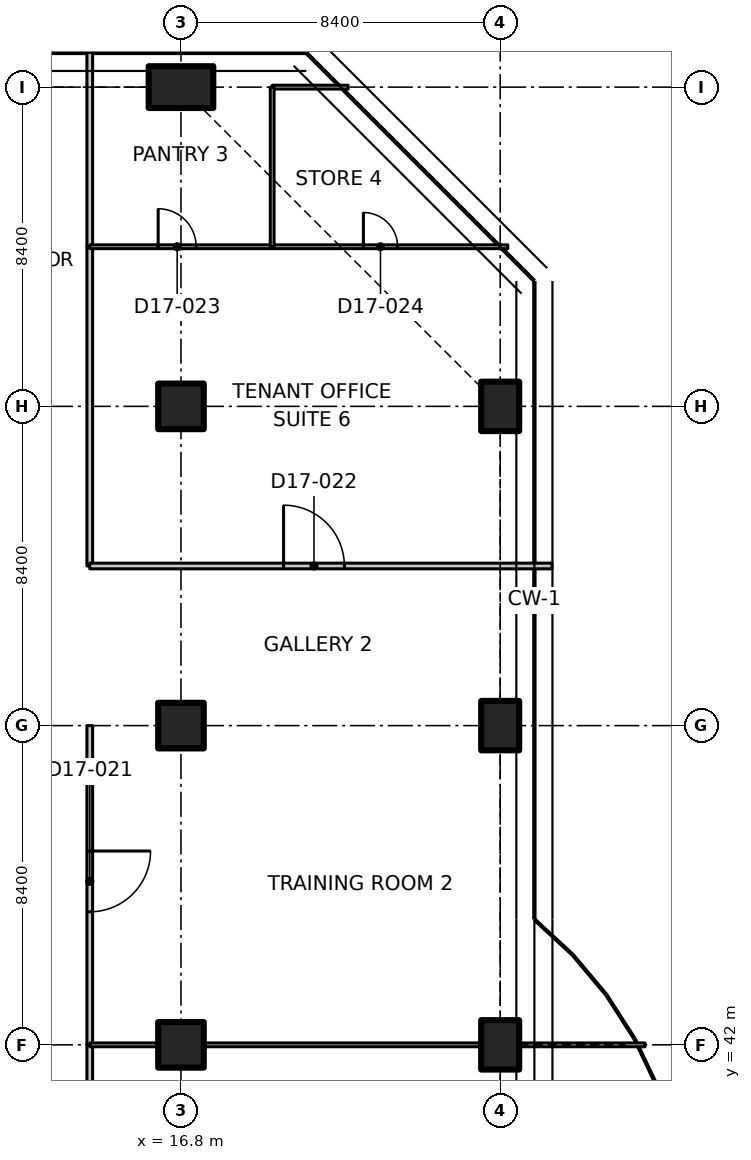
"""IFC4 building model, lengths in metres.
Left out: names, types, materials, properties, quantities, classifications, styles, units other than length and angle.
Written with IfcOpenShell. Run it as: python <this file> out.ifc"""

import sys

from ifc_helpers import new_model, si_unit, direction, frame, frame_2d, origin, origin_2d, place, context, subcontext, project, spatial, polyline, rectangle, outline, extrude, element, fill, save


model = new_model("IFC4")
c1 = context("Model", 3, precision=1e-05, world=origin(), true_north=direction((0.0, 1.0)))
c2 = subcontext(c1, "Body", "Model", "MODEL_VIEW")
j1 = project(units=[si_unit("LENGTHUNIT", "METRE"), si_unit("PLANEANGLEUNIT", "RADIAN")], contexts=[c1])
p1 = place(None, origin())
s1 = spatial("IfcSite", under=j1, at=p1, CompositionType="ELEMENT")
p2 = place(p1, origin())
s2 = spatial("IfcBuilding", under=s1, at=p2, CompositionType="ELEMENT")
p3 = place(p2, frame((0.0, 0.0, 142.1)))
s3 = spatial("IfcBuildingStorey", under=s2, at=p3, CompositionType="ELEMENT", Elevation=142.1)
for number, where, z_axis, x_axis in (
    (1, (16.8, 42.0, 0.0), (0.0, 0.0, 1.0), (1.0, 0.0, 0.0)),
    (2, (16.8, 50.4, 0.0), (0.0, 0.0, 1.0), (1.0, 0.0, 0.0)),
    (3, (16.8, 58.8, 0.0), (0.0, 0.0, 1.0), (1.0, 0.0, 0.0)),
):
    element("IfcColumn", number, at=place(p3, frame(where, z_axis=z_axis, x_axis=x_axis)), inside=s3, PredefinedType="COLUMN", context=c2, shape_type="SweptSolid", body=[
        extrude(rectangle(XDim=1.2, YDim=1.2, at=origin_2d()), origin(), (0.0, 0.0, 1.0), 3.35),
    ])
p4 = place(p3, frame((16.8, 67.2, 0.0), z_axis=(0.0, 0.0, 1.0), x_axis=(0.0, 1.0, 0.0)))
e4 = element("IfcColumn", 4, at=p4, inside=s3, PredefinedType="COLUMN", context=c2, shape_type="SweptSolid", body=[
    extrude(rectangle(XDim=1.1, YDim=1.7, at=origin_2d()), origin(), (0.0, 0.0, 1.0), 3.35),
])
for number, where, z_axis, x_axis in (
    (5, (25.2, 42.0, 0.0), (0.0, 0.0, 1.0), (1.0, 0.0, 0.0)),
    (6, (25.2, 50.4, 0.0), (0.0, 0.0, 1.0), (1.0, 0.0, 0.0)),
    (7, (25.2, 58.8, 0.0), (0.0, 0.0, 1.0), (1.0, 0.0, 0.0)),
):
    element("IfcColumn", number, at=place(p3, frame(where, z_axis=z_axis, x_axis=x_axis)), inside=s3, PredefinedType="COLUMN", context=c2, shape_type="SweptSolid", body=[
        extrude(rectangle(XDim=1.0, YDim=1.3, at=origin_2d()), origin(), (0.0, 0.0, 1.0), 3.35),
    ])
p5 = place(p3, frame((14.4, 42.0, 0.0), z_axis=(0.0, 0.0, 1.0), x_axis=(0.0, -1.0, 0.0)))
e8 = element("IfcWall", 8, at=p5, inside=s3, PredefinedType="PARTITIONING", context=c2, shape_type="SweptSolid", body=[
    extrude(rectangle(XDim=8.4, YDim=0.15, at=frame_2d((4.2, 0.0))), origin(), (0.0, 0.0, 1.0), 3.33),
])
p6 = place(p3, frame((14.4, 50.4, 0.0), z_axis=(0.0, 0.0, 1.0), x_axis=(0.0, -1.0, 0.0)))
e9 = element("IfcWall", 9, at=p6, inside=s3, PredefinedType="PARTITIONING", context=c2, shape_type="SweptSolid", body=[
    extrude(rectangle(XDim=8.4, YDim=0.15, at=frame_2d((4.2, 0.0))), origin(), (0.0, 0.0, 1.0), 3.33),
])
p7 = place(p6, frame((3.3, 0.0, 0.0)))
e10 = element("IfcOpeningElement", 10, at=p7, cuts=e9, PredefinedType="OPENING", context=c2, shape_type="SweptSolid", body=[
    extrude(rectangle(XDim=1.6, YDim=2.1, at=frame_2d((0.8, 1.05))), frame((0.0, 0.085, 0.0), z_axis=(0.0, -1.0, 0.0), x_axis=(1.0, 0.0, 0.0)), (0.0, 0.0, 1.0), 0.17),
])
p8 = place(p3, frame((14.4, 63.0, 0.0), z_axis=(0.0, 0.0, 1.0), x_axis=(0.0, -1.0, 0.0)))
e11 = element("IfcWall", 11, at=p8, inside=s3, PredefinedType="PARTITIONING", context=c2, shape_type="SweptSolid", body=[
    extrude(rectangle(XDim=8.4, YDim=0.15, at=frame_2d((4.2, 0.0))), origin(), (0.0, 0.0, 1.0), 3.33),
])
p9 = place(p3, frame((14.4, 68.28, 0.0), z_axis=(0.0, 0.0, 1.0), x_axis=(0.0, -1.0, 0.0)))
e12 = element("IfcWall", 12, at=p9, inside=s3, PredefinedType="PARTITIONING", context=c2, shape_type="SweptSolid", body=[
    extrude(outline(polyline([(0.0, 0.0), (5.28, 0.0), (5.28, 3.33), (1.53, 3.33), (1.528, 2.98), (0.632, 2.98), (0.63, 3.33), (0.0, 3.33), (0.0, 0.0)])), frame((0.0, 0.075, 0.0), z_axis=(0.0, -1.0, 0.0), x_axis=(1.0, 0.0, 0.0)), (0.0, 0.0, 1.0), 0.15),
])
p10 = place(p3, frame((14.4, 54.6, 0.0), z_axis=(0.0, 0.0, 1.0), x_axis=(1.0, 0.0, 0.0)))
e13 = element("IfcWall", 13, at=p10, inside=s3, PredefinedType="PARTITIONING", context=c2, shape_type="SweptSolid", body=[
    extrude(outline(polyline([(0.0, 0.0), (12.165, 0.0), (12.165, 3.33), (11.9, 3.33), (11.25, 3.33), (11.248, 2.98), (10.352, 2.98), (10.35, 3.33), (0.0, 3.33), (0.0, 0.0)])), frame((0.0, 0.075, 0.0), z_axis=(0.0, -1.0, 0.0), x_axis=(1.0, 0.0, 0.0)), (0.0, 0.0, 1.0), 0.15),
])
p11 = place(p10, frame((5.1, 0.0, 0.0)))
e14 = element("IfcOpeningElement", 14, at=p11, cuts=e13, PredefinedType="OPENING", context=c2, shape_type="SweptSolid", body=[
    extrude(rectangle(XDim=1.6, YDim=2.1, at=frame_2d((0.8, 1.05))), frame((0.0, 0.085, 0.0), z_axis=(0.0, -1.0, 0.0), x_axis=(1.0, 0.0, 0.0)), (0.0, 0.0, 1.0), 0.17),
])
p12 = place(p3, frame((14.4, 42.0, 0.0), z_axis=(0.0, 0.0, 1.0), x_axis=(1.0, 0.0, 0.0)))
e15 = element("IfcWall", 15, at=p12, inside=s3, PredefinedType="PARTITIONING", context=c2, shape_type="SweptSolid", body=[
    extrude(rectangle(XDim=1.78, YDim=0.1, at=frame_2d((0.89, 0.0))), origin(), (0.0, 0.0, 1.0), 3.33),
])
p13 = place(p3, frame((17.42, 42.0, 0.0), z_axis=(0.0, 0.0, 1.0), x_axis=(1.0, 0.0, 0.0)))
e16 = element("IfcWall", 16, at=p13, inside=s3, PredefinedType="PARTITIONING", context=c2, shape_type="SweptSolid", body=[
    extrude(rectangle(XDim=7.26, YDim=0.1, at=frame_2d((3.63, 0.0))), origin(), (0.0, 0.0, 1.0), 3.33),
])
p14 = place(p3, frame((25.72, 42.0, 0.0), z_axis=(0.0, 0.0, 1.0), x_axis=(1.0, 0.0, 0.0)))
e17 = element("IfcWall", 17, at=p14, inside=s3, PredefinedType="PARTITIONING", context=c2, shape_type="SweptSolid", body=[
    extrude(rectangle(XDim=3.292, YDim=0.1, at=frame_2d((1.646, 0.0))), origin(), (0.0, 0.0, 1.0), 2.98),
])
p15 = place(p3, frame((14.4, 63.0, 0.0), z_axis=(0.0, 0.0, 1.0), x_axis=(1.0, 0.0, 0.0)))
e18 = element("IfcWall", 18, at=p15, inside=s3, PredefinedType="PARTITIONING", context=c2, shape_type="SweptSolid", body=[
    extrude(rectangle(XDim=4.8, YDim=0.1, at=frame_2d((2.4, 0.0))), origin(), (0.0, 0.0, 1.0), 3.33),
])
p16 = place(p15, frame((1.8, 0.0, 0.0)))
e19 = element("IfcOpeningElement", 19, at=p16, cuts=e18, PredefinedType="OPENING", context=c2, shape_type="SweptSolid", body=[
    extrude(rectangle(XDim=1.0, YDim=2.1, at=frame_2d((0.5, 1.05))), frame((0.0, 0.06, 0.0), z_axis=(0.0, -1.0, 0.0), x_axis=(1.0, 0.0, 0.0)), (0.0, 0.0, 1.0), 0.12),
])
p17 = place(p3, frame((19.2, 63.0, 0.0), z_axis=(0.0, 0.0, 1.0), x_axis=(1.0, 0.0, 0.0)))
e20 = element("IfcWall", 20, at=p17, inside=s3, PredefinedType="PARTITIONING", context=c2, shape_type="SweptSolid", body=[
    extrude(outline(polyline([(0.0, 0.0), (6.2, 0.0), (6.2, 3.33), (2.466, 3.33), (2.464, 2.98), (1.136, 2.98), (1.134, 3.33), (0.0, 3.33), (0.0, 0.0)])), frame((0.0, 0.05, 0.0), z_axis=(0.0, -1.0, 0.0), x_axis=(1.0, 0.0, 0.0)), (0.0, 0.0, 1.0), 0.1),
])
p18 = place(p17, frame((2.4, 0.0, 0.0)))
e21 = element("IfcOpeningElement", 21, at=p18, cuts=e20, PredefinedType="OPENING", context=c2, shape_type="SweptSolid", body=[
    extrude(rectangle(XDim=0.9, YDim=2.1, at=frame_2d((0.45, 1.05))), frame((0.0, 0.06, 0.0), z_axis=(0.0, -1.0, 0.0), x_axis=(1.0, 0.0, 0.0)), (0.0, 0.0, 1.0), 0.12),
])
p19 = place(p3, frame((21.2, 67.2, 0.0), z_axis=(0.0, 0.0, 1.0), x_axis=(-1.0, 0.0, 0.0)))
e22 = element("IfcWall", 22, at=p19, inside=s3, PredefinedType="PARTITIONING", context=c2, shape_type="SweptSolid", body=[
    extrude(rectangle(XDim=2.0, YDim=0.1, at=frame_2d((1.0, 0.0))), origin(), (0.0, 0.0, 1.0), 3.33),
])
p20 = place(p3, frame((19.2, 67.2, 0.0), z_axis=(0.0, 0.0, 1.0), x_axis=(0.0, -1.0, 0.0)))
e23 = element("IfcWall", 23, at=p20, inside=s3, PredefinedType="PARTITIONING", context=c2, shape_type="SweptSolid", body=[
    extrude(rectangle(XDim=4.2, YDim=0.1, at=frame_2d((2.1, 0.0))), origin(), (0.0, 0.0, 1.0), 2.98),
])
p21 = place(p7, origin())
e24 = element("IfcDoor", 24, at=p21, inside=s3, OperationType="DOUBLE_DOOR_SINGLE_SWING", PredefinedType="DOOR", context=c2, shape_type="SweptSolid", body=[
    extrude(rectangle(XDim=1.6, YDim=2.1, at=frame_2d((0.8, 1.05))), frame((0.0, 0.025, 0.0), z_axis=(0.0, -1.0, 0.0), x_axis=(1.0, 0.0, 0.0)), (0.0, 0.0, 1.0), 0.05),
])
fill(e10, e24)
p22 = place(p11, origin())
e25 = element("IfcDoor", 25, at=p22, inside=s3, OperationType="DOUBLE_DOOR_SINGLE_SWING", PredefinedType="DOOR", context=c2, shape_type="SweptSolid", body=[
    extrude(rectangle(XDim=1.6, YDim=2.1, at=frame_2d((0.8, 1.05))), frame((0.0, 0.025, 0.0), z_axis=(0.0, -1.0, 0.0), x_axis=(1.0, 0.0, 0.0)), (0.0, 0.0, 1.0), 0.05),
])
fill(e14, e25)
p23 = place(p16, origin())
e26 = element("IfcDoor", 26, at=p23, inside=s3, OperationType="SINGLE_SWING_LEFT", PredefinedType="DOOR", context=c2, shape_type="SweptSolid", body=[
    extrude(rectangle(XDim=1.0, YDim=2.1, at=frame_2d((0.5, 1.05))), frame((0.0, 0.025, 0.0), z_axis=(0.0, -1.0, 0.0), x_axis=(1.0, 0.0, 0.0)), (0.0, 0.0, 1.0), 0.05),
])
fill(e19, e26)
p24 = place(p18, origin())
e27 = element("IfcDoor", 27, at=p24, inside=s3, OperationType="SINGLE_SWING_LEFT", PredefinedType="DOOR", context=c2, shape_type="SweptSolid", body=[
    extrude(rectangle(XDim=0.9, YDim=2.1, at=frame_2d((0.45, 1.05))), frame((0.0, 0.025, 0.0), z_axis=(0.0, -1.0, 0.0), x_axis=(1.0, 0.0, 0.0)), (0.0, 0.0, 1.0), 0.05),
])
fill(e21, e27)
save(model, sys.argv[1])
